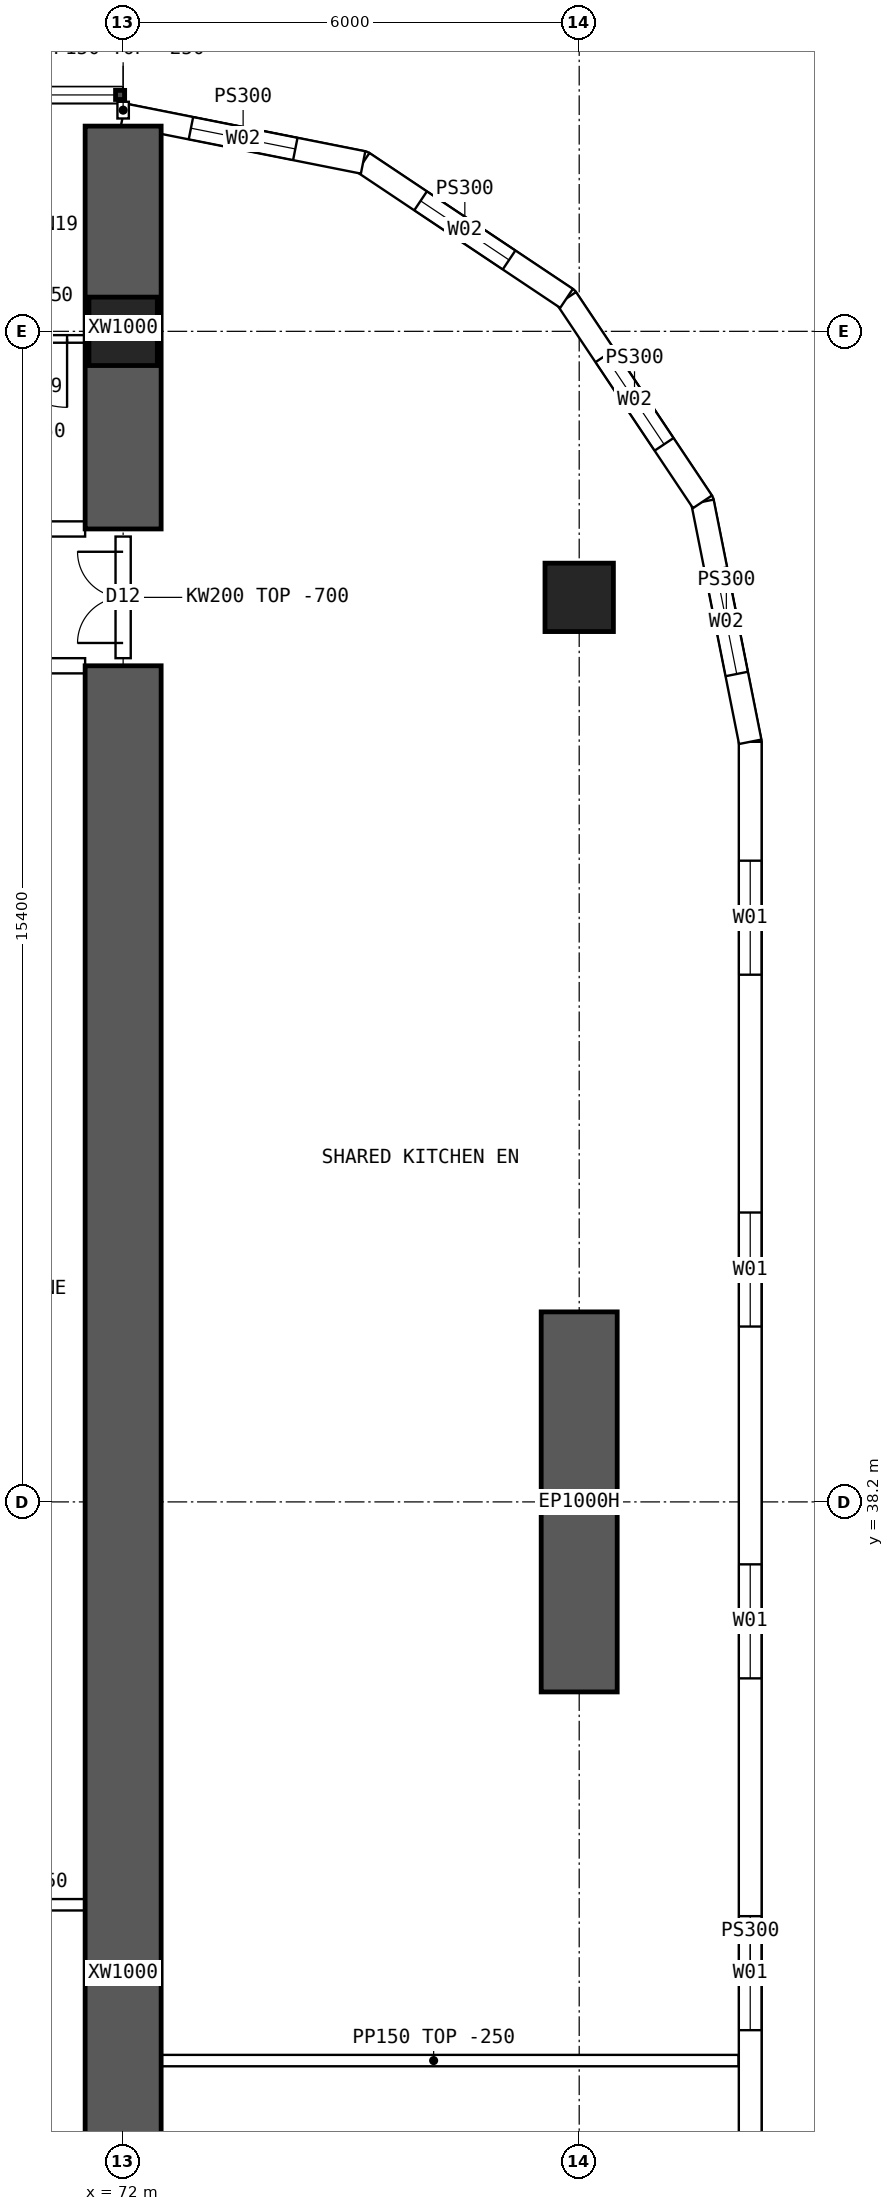
"""IFC4 building model, lengths in metres.
Left out: names, types, materials, properties, quantities, classifications, styles, units other than length and angle.
Written with IfcOpenShell. Run it as: python <this file> out.ifc"""

import sys

from ifc_helpers import new_model, si_unit, direction, frame, frame_2d, origin, origin_2d, place, context, subcontext, project, spatial, polyline, rectangle, hollow_rectangle, outline, extrude, element, fill, save


model = new_model("IFC4")
c1 = context("Model", 3, precision=1e-05, world=origin(), true_north=direction((0.0, 1.0)))
c2 = subcontext(c1, "Body", "Model", "MODEL_VIEW")
j1 = project(units=[si_unit("LENGTHUNIT", "METRE"), si_unit("PLANEANGLEUNIT", "RADIAN")], contexts=[c1])
p1 = place(None, origin())
s1 = spatial("IfcSite", under=j1, at=p1, CompositionType="ELEMENT")
p2 = place(p1, origin())
s2 = spatial("IfcBuilding", under=s1, at=p2, CompositionType="ELEMENT")
p3 = place(p2, frame((0.0, 0.0, 27.7)))
s3 = spatial("IfcBuildingStorey", under=s2, at=p3, CompositionType="ELEMENT", Elevation=27.7)
for number, where, z_axis, x_axis in (
    (1, (72.0, 53.6, 0.0), (0.0, 0.0, 1.0), (1.0, 0.0, 0.0)),
    (2, (78.0, 50.1, 0.0), (0.0, 0.0, 1.0), (1.0, 0.0, 0.0)),
):
    element("IfcColumn", number, at=place(p3, frame(where, z_axis=z_axis, x_axis=x_axis)), inside=s3, PredefinedType="COLUMN", context=c2, shape_type="SweptSolid", body=[
        extrude(hollow_rectangle(XDim=0.9, YDim=0.9, WallThickness=0.09, at=origin_2d()), origin(), (0.0, 0.0, 1.0), 3.75),
    ])
p4 = place(p3, frame((78.0, 35.7, 0.0), z_axis=(0.0, 0.0, 1.0), x_axis=(0.0, 1.0, 0.0)))
e3 = element("IfcWall", 3, at=p4, inside=s3, PredefinedType="SHEAR", context=c2, shape_type="SweptSolid", body=[
    extrude(rectangle(XDim=5.0, YDim=1.0, at=frame_2d((2.5, 0.0))), origin(), (0.0, 0.0, 1.0), 3.75),
])
p5 = place(p3, frame((72.0, 51.0, 0.0), z_axis=(0.0, 0.0, 1.0), x_axis=(0.0, 1.0, 0.0)))
e4 = element("IfcWall", 4, at=p5, inside=s3, PredefinedType="SHEAR", context=c2, shape_type="SweptSolid", body=[
    extrude(rectangle(XDim=5.3, YDim=1.0, at=frame_2d((2.65, 0.0))), origin(), (0.0, 0.0, 1.0), 3.75),
])
p6 = place(p3, frame((72.0, 14.8, 0.0), z_axis=(0.0, 0.0, 1.0), x_axis=(0.0, 1.0, 0.0)))
e5 = element("IfcWall", 5, at=p6, inside=s3, PredefinedType="SHEAR", context=c2, shape_type="SweptSolid", body=[
    extrude(rectangle(XDim=34.4, YDim=1.0, at=frame_2d((17.2, 0.0))), origin(), (0.0, 0.0, 1.0), 3.75),
])
p7 = place(p3, frame((80.25, 15.8, 0.0), z_axis=(0.0, 0.0, 1.0), x_axis=(0.0, 1.0, 0.0)))
e6 = element("IfcWall", 6, at=p7, inside=s3, PredefinedType="SOLIDWALL", context=c2, shape_type="SweptSolid", body=[
    extrude(outline(polyline([(-0.015, -0.15), (32.415, -0.15), (32.385, 0.15), (0.015, 0.15), (-0.015, -0.15)])), origin(), (0.0, 0.0, 1.0), 3.5),
])
p8 = place(p7, frame((1.564, 0.0, 0.9)))
e7 = element("IfcOpeningElement", 7, at=p8, cuts=e6, PredefinedType="OPENING", context=c2, shape_type="SweptSolid", body=[
    extrude(rectangle(XDim=1.5, YDim=2.0, at=frame_2d((0.75, 1.0))), frame((0.0, 0.16, 0.0), z_axis=(0.0, -1.0, 0.0), x_axis=(1.0, 0.0, 0.0)), (0.0, 0.0, 1.0), 0.32),
])
p9 = place(p7, frame((6.193, 0.0, 0.9)))
e8 = element("IfcOpeningElement", 8, at=p9, cuts=e6, PredefinedType="OPENING", context=c2, shape_type="SweptSolid", body=[
    extrude(rectangle(XDim=1.5, YDim=2.0, at=frame_2d((0.75, 1.0))), frame((0.0, 0.16, 0.0), z_axis=(0.0, -1.0, 0.0), x_axis=(1.0, 0.0, 0.0)), (0.0, 0.0, 1.0), 0.32),
])
p10 = place(p7, frame((10.822, 0.0, 0.9)))
e9 = element("IfcOpeningElement", 9, at=p10, cuts=e6, PredefinedType="OPENING", context=c2, shape_type="SweptSolid", body=[
    extrude(rectangle(XDim=1.5, YDim=2.0, at=frame_2d((0.75, 1.0))), frame((0.0, 0.16, 0.0), z_axis=(0.0, -1.0, 0.0), x_axis=(1.0, 0.0, 0.0)), (0.0, 0.0, 1.0), 0.32),
])
p11 = place(p7, frame((15.45, 0.0, 0.9)))
e10 = element("IfcOpeningElement", 10, at=p11, cuts=e6, PredefinedType="OPENING", context=c2, shape_type="SweptSolid", body=[
    extrude(rectangle(XDim=1.5, YDim=2.0, at=frame_2d((0.75, 1.0))), frame((0.0, 0.16, 0.0), z_axis=(0.0, -1.0, 0.0), x_axis=(1.0, 0.0, 0.0)), (0.0, 0.0, 1.0), 0.32),
])
p12 = place(p7, frame((20.079, 0.0, 0.9)))
e11 = element("IfcOpeningElement", 11, at=p12, cuts=e6, PredefinedType="OPENING", context=c2, shape_type="SweptSolid", body=[
    extrude(rectangle(XDim=1.5, YDim=2.0, at=frame_2d((0.75, 1.0))), frame((0.0, 0.16, 0.0), z_axis=(0.0, -1.0, 0.0), x_axis=(1.0, 0.0, 0.0)), (0.0, 0.0, 1.0), 0.32),
])
p13 = place(p7, frame((24.707, 0.0, 0.9)))
e12 = element("IfcOpeningElement", 12, at=p13, cuts=e6, PredefinedType="OPENING", context=c2, shape_type="SweptSolid", body=[
    extrude(rectangle(XDim=1.5, YDim=2.0, at=frame_2d((0.75, 1.0))), frame((0.0, 0.16, 0.0), z_axis=(0.0, -1.0, 0.0), x_axis=(1.0, 0.0, 0.0)), (0.0, 0.0, 1.0), 0.32),
])
p14 = place(p7, frame((29.336, 0.0, 0.9)))
e13 = element("IfcOpeningElement", 13, at=p14, cuts=e6, PredefinedType="OPENING", context=c2, shape_type="SweptSolid", body=[
    extrude(rectangle(XDim=1.5, YDim=2.0, at=frame_2d((0.75, 1.0))), frame((0.0, 0.16, 0.0), z_axis=(0.0, -1.0, 0.0), x_axis=(1.0, 0.0, 0.0)), (0.0, 0.0, 1.0), 0.32),
])
p15 = place(p3, frame((80.25, 48.2, 0.0), z_axis=(0.0, 0.0, 1.0), x_axis=(-0.195065901187, 0.980790137692, 0.0)))
e14 = element("IfcWall", 14, at=p15, inside=s3, PredefinedType="SOLIDWALL", context=c2, shape_type="SweptSolid", body=[
    extrude(outline(polyline([(-0.015, -0.15), (3.249, -0.15), (3.189, 0.15), (0.015, 0.15), (-0.015, -0.15)])), origin(), (0.0, 0.0, 1.0), 3.5),
])
p16 = place(p15, frame((0.909, 0.0, 0.9)))
e15 = element("IfcOpeningElement", 15, at=p16, cuts=e14, PredefinedType="OPENING", context=c2, shape_type="SweptSolid", body=[
    extrude(rectangle(XDim=1.4, YDim=1.8, at=frame_2d((0.7, 0.9))), frame((0.0, 0.16, 0.0), z_axis=(0.0, -1.0, 0.0), x_axis=(1.0, 0.0, 0.0)), (0.0, 0.0, 1.0), 0.32),
])
p17 = place(p3, frame((79.622, 51.357, 0.0), z_axis=(0.0, 0.0, 1.0), x_axis=(-0.555609954424, 0.831443069936, 0.0)))
e16 = element("IfcWall", 16, at=p17, inside=s3, PredefinedType="SOLIDWALL", context=c2, shape_type="SweptSolid", body=[
    extrude(outline(polyline([(-0.03, -0.15), (3.249, -0.15), (3.189, 0.15), (0.03, 0.15), (-0.03, -0.15)])), origin(), (0.0, 0.0, 1.0), 3.5),
])
p18 = place(p17, frame((0.909, 0.0, 0.9)))
e17 = element("IfcOpeningElement", 17, at=p18, cuts=e16, PredefinedType="OPENING", context=c2, shape_type="SweptSolid", body=[
    extrude(rectangle(XDim=1.4, YDim=1.8, at=frame_2d((0.7, 0.9))), frame((0.0, 0.16, 0.0), z_axis=(0.0, -1.0, 0.0), x_axis=(1.0, 0.0, 0.0)), (0.0, 0.0, 1.0), 0.32),
])
p19 = place(p3, frame((77.833, 54.034, 0.0), z_axis=(0.0, 0.0, 1.0), x_axis=(-0.831478105043, 0.555557522525, 0.0)))
e18 = element("IfcWall", 18, at=p19, inside=s3, PredefinedType="SOLIDWALL", context=c2, shape_type="SweptSolid", body=[
    extrude(outline(polyline([(-0.03, -0.15), (3.249, -0.15), (3.189, 0.15), (0.03, 0.15), (-0.03, -0.15)])), origin(), (0.0, 0.0, 1.0), 3.5),
])
p20 = place(p19, frame((0.909, 0.0, 0.9)))
e19 = element("IfcOpeningElement", 19, at=p20, cuts=e18, PredefinedType="OPENING", context=c2, shape_type="SweptSolid", body=[
    extrude(rectangle(XDim=1.4, YDim=1.8, at=frame_2d((0.7, 0.9))), frame((0.0, 0.16, 0.0), z_axis=(0.0, -1.0, 0.0), x_axis=(1.0, 0.0, 0.0)), (0.0, 0.0, 1.0), 0.32),
])
p21 = place(p3, frame((75.157, 55.822, 0.0), z_axis=(0.0, 0.0, 1.0), x_axis=(-0.980787251524, 0.195080412259, 0.0)))
e20 = element("IfcWall", 20, at=p21, inside=s3, PredefinedType="SOLIDWALL", context=c2, shape_type="SweptSolid", body=[
    extrude(outline(polyline([(-0.03, -0.15), (3.249, -0.15), (3.189, 0.15), (0.03, 0.15), (-0.03, -0.15)])), origin(), (0.0, 0.0, 1.0), 3.5),
])
p22 = place(p21, frame((0.909, 0.0, 0.9)))
e21 = element("IfcOpeningElement", 21, at=p22, cuts=e20, PredefinedType="OPENING", context=c2, shape_type="SweptSolid", body=[
    extrude(rectangle(XDim=1.4, YDim=1.8, at=frame_2d((0.7, 0.9))), frame((0.0, 0.16, 0.0), z_axis=(0.0, -1.0, 0.0), x_axis=(1.0, 0.0, 0.0)), (0.0, 0.0, 1.0), 0.32),
])
p23 = place(p3, frame((66.5, 51.0, 0.0), z_axis=(0.0, 0.0, 1.0), x_axis=(1.0, 0.0, 0.0)))
e22 = element("IfcWall", 22, at=p23, inside=s3, PredefinedType="SOLIDWALL", context=c2, shape_type="SweptSolid", body=[
    extrude(outline(polyline([(0.0, 0.0), (5.0, 0.0), (5.0, 3.1), (0.0, 3.1), (0.0, 0.0)])), frame((0.0, 0.1, 0.0), z_axis=(0.0, -1.0, 0.0), x_axis=(1.0, 0.0, 0.0)), (0.0, 0.0, 1.0), 0.2),
])
p24 = place(p23, frame((1.425, 0.0, 0.0)))
e23 = element("IfcOpeningElement", 23, at=p24, cuts=e22, PredefinedType="OPENING", context=c2, shape_type="SweptSolid", body=[
    extrude(rectangle(XDim=0.9, YDim=2.1, at=frame_2d((0.45, 1.05))), frame((0.0, 0.11, 0.0), z_axis=(0.0, -1.0, 0.0), x_axis=(1.0, 0.0, 0.0)), (0.0, 0.0, 1.0), 0.22),
])
p25 = place(p23, frame((2.675, 0.0, 0.0)))
e24 = element("IfcOpeningElement", 24, at=p25, cuts=e22, PredefinedType="OPENING", context=c2, shape_type="SweptSolid", body=[
    extrude(rectangle(XDim=0.9, YDim=2.1, at=frame_2d((0.45, 1.05))), frame((0.0, 0.11, 0.0), z_axis=(0.0, -1.0, 0.0), x_axis=(1.0, 0.0, 0.0)), (0.0, 0.0, 1.0), 0.22),
])
p26 = place(p3, frame((66.5, 49.2, 0.0), z_axis=(0.0, 0.0, 1.0), x_axis=(1.0, 0.0, 0.0)))
e25 = element("IfcWall", 25, at=p26, inside=s3, PredefinedType="SOLIDWALL", context=c2, shape_type="SweptSolid", body=[
    extrude(rectangle(XDim=5.0, YDim=0.2, at=frame_2d((2.5, 0.0))), origin(), (0.0, 0.0, 1.0), 3.5),
])
p27 = place(p26, frame((0.2, 0.0, 0.0)))
e26 = element("IfcOpeningElement", 26, at=p27, cuts=e25, PredefinedType="OPENING", context=c2, shape_type="SweptSolid", body=[
    extrude(rectangle(XDim=1.6, YDim=2.1, at=frame_2d((0.8, 1.05))), frame((0.0, 0.11, 0.0), z_axis=(0.0, -1.0, 0.0), x_axis=(1.0, 0.0, 0.0)), (0.0, 0.0, 1.0), 0.22),
])
p28 = place(p3, frame((70.125, 53.5, 0.0), z_axis=(0.0, 0.0, 1.0), x_axis=(1.0, 0.0, 0.0)))
e27 = element("IfcWall", 27, at=p28, inside=s3, PredefinedType="PARTITIONING", context=c2, shape_type="SweptSolid", body=[
    extrude(outline(polyline([(0.0, 0.0), (1.425, 0.0), (1.425, 3.1), (0.0, 3.1), (0.0, 0.0)])), frame((0.0, 0.05, 0.0), z_axis=(0.0, -1.0, 0.0), x_axis=(1.0, 0.0, 0.0)), (0.0, 0.0, 1.0), 0.1),
])
p29 = place(p28, frame((0.238, 0.0, 0.0)))
e28 = element("IfcOpeningElement", 28, at=p29, cuts=e27, PredefinedType="OPENING", context=c2, shape_type="SweptSolid", body=[
    extrude(rectangle(XDim=0.9, YDim=2.1, at=frame_2d((0.45, 1.05))), frame((0.0, 0.06, 0.0), z_axis=(0.0, -1.0, 0.0), x_axis=(1.0, 0.0, 0.0)), (0.0, 0.0, 1.0), 0.12),
])
p30 = place(p3, frame((68.4, 32.9, 0.0), z_axis=(0.0, 0.0, 1.0), x_axis=(1.0, 0.0, 0.0)))
e29 = element("IfcWall", 29, at=p30, inside=s3, PredefinedType="PARTITIONING", context=c2, shape_type="SweptSolid", body=[
    extrude(rectangle(XDim=3.6, YDim=0.15, at=frame_2d((1.8, 0.0))), origin(), (0.0, 0.0, 1.0), 3.5),
])
p31 = place(p3, frame((72.075, 30.85, 0.0), z_axis=(0.0, 0.0, 1.0), x_axis=(1.0, 0.0, 0.0)))
e30 = element("IfcWall", 30, at=p31, inside=s3, PredefinedType="PARTITIONING", context=c2, shape_type="SweptSolid", body=[
    extrude(outline(polyline([(0.0, 0.0), (8.02, 0.0), (8.02, 3.5), (6.227, 3.5), (6.225, 3.05), (5.627, 3.05), (5.625, 3.5), (0.0, 3.5), (0.0, 0.0)])), frame((0.0, 0.075, 0.0), z_axis=(0.0, -1.0, 0.0), x_axis=(1.0, 0.0, 0.0)), (0.0, 0.0, 1.0), 0.15),
])
p32 = place(p3, frame((72.0, 49.3, 0.0), z_axis=(0.0, 0.0, 1.0), x_axis=(0.0, 1.0, 0.0)))
e31 = element("IfcWall", 31, at=p32, inside=s3, PredefinedType="SOLIDWALL", context=c2, shape_type="SweptSolid", body=[
    extrude(outline(polyline([(0.0, 0.0), (1.6, 0.0), (1.6, 3.05), (0.0, 3.05), (0.0, 0.0)])), frame((0.0, 0.1, 0.0), z_axis=(0.0, -1.0, 0.0), x_axis=(1.0, 0.0, 0.0)), (0.0, 0.0, 1.0), 0.2),
])
p33 = place(p32, frame((0.2, 0.0, 0.0)))
e32 = element("IfcOpeningElement", 32, at=p33, cuts=e31, PredefinedType="OPENING", context=c2, shape_type="SweptSolid", body=[
    extrude(rectangle(XDim=1.2, YDim=2.1, at=frame_2d((0.6, 1.05))), frame((0.0, 0.11, 0.0), z_axis=(0.0, -1.0, 0.0), x_axis=(1.0, 0.0, 0.0)), (0.0, 0.0, 1.0), 0.22),
])
p34 = place(p3, frame((72.0, 56.4, 0.0), z_axis=(0.0, 0.0, 1.0), x_axis=(0.0, 1.0, 0.0)))
e33 = element("IfcWall", 33, at=p34, inside=s3, PredefinedType="PARTITIONING", context=c2, shape_type="SweptSolid", body=[
    extrude(rectangle(XDim=0.22, YDim=0.15, at=frame_2d((0.11, 0.0))), origin(), (0.0, 0.0, 1.0), 3.5),
])
p35 = place(p11, origin())
e34 = element("IfcWindow", 34, at=p35, inside=s3, PartitioningType="SINGLE_PANEL", PredefinedType="WINDOW", context=c2, shape_type="SweptSolid", body=[
    extrude(rectangle(XDim=1.5, YDim=2.0, at=frame_2d((0.75, 1.0))), frame((0.0, 0.03, 0.0), z_axis=(0.0, -1.0, 0.0), x_axis=(1.0, 0.0, 0.0)), (0.0, 0.0, 1.0), 0.06),
])
fill(e10, e34)
p36 = place(p12, origin())
e35 = element("IfcWindow", 35, at=p36, inside=s3, PartitioningType="SINGLE_PANEL", PredefinedType="WINDOW", context=c2, shape_type="SweptSolid", body=[
    extrude(rectangle(XDim=1.5, YDim=2.0, at=frame_2d((0.75, 1.0))), frame((0.0, 0.03, 0.0), z_axis=(0.0, -1.0, 0.0), x_axis=(1.0, 0.0, 0.0)), (0.0, 0.0, 1.0), 0.06),
])
fill(e11, e35)
p37 = place(p13, origin())
e36 = element("IfcWindow", 36, at=p37, inside=s3, PartitioningType="SINGLE_PANEL", PredefinedType="WINDOW", context=c2, shape_type="SweptSolid", body=[
    extrude(rectangle(XDim=1.5, YDim=2.0, at=frame_2d((0.75, 1.0))), frame((0.0, 0.03, 0.0), z_axis=(0.0, -1.0, 0.0), x_axis=(1.0, 0.0, 0.0)), (0.0, 0.0, 1.0), 0.06),
])
fill(e12, e36)
p38 = place(p14, origin())
e37 = element("IfcWindow", 37, at=p38, inside=s3, PartitioningType="SINGLE_PANEL", PredefinedType="WINDOW", context=c2, shape_type="SweptSolid", body=[
    extrude(rectangle(XDim=1.5, YDim=2.0, at=frame_2d((0.75, 1.0))), frame((0.0, 0.03, 0.0), z_axis=(0.0, -1.0, 0.0), x_axis=(1.0, 0.0, 0.0)), (0.0, 0.0, 1.0), 0.06),
])
fill(e13, e37)
p39 = place(p16, origin())
e38 = element("IfcWindow", 38, at=p39, inside=s3, PartitioningType="SINGLE_PANEL", PredefinedType="WINDOW", context=c2, shape_type="SweptSolid", body=[
    extrude(rectangle(XDim=1.4, YDim=1.8, at=frame_2d((0.7, 0.9))), frame((0.0, 0.03, 0.0), z_axis=(0.0, -1.0, 0.0), x_axis=(1.0, 0.0, 0.0)), (0.0, 0.0, 1.0), 0.06),
])
fill(e15, e38)
p40 = place(p18, origin())
e39 = element("IfcWindow", 39, at=p40, inside=s3, PartitioningType="SINGLE_PANEL", PredefinedType="WINDOW", context=c2, shape_type="SweptSolid", body=[
    extrude(rectangle(XDim=1.4, YDim=1.8, at=frame_2d((0.7, 0.9))), frame((0.0, 0.03, 0.0), z_axis=(0.0, -1.0, 0.0), x_axis=(1.0, 0.0, 0.0)), (0.0, 0.0, 1.0), 0.06),
])
fill(e17, e39)
p41 = place(p20, origin())
e40 = element("IfcWindow", 40, at=p41, inside=s3, PartitioningType="SINGLE_PANEL", PredefinedType="WINDOW", context=c2, shape_type="SweptSolid", body=[
    extrude(rectangle(XDim=1.4, YDim=1.8, at=frame_2d((0.7, 0.9))), frame((0.0, 0.03, 0.0), z_axis=(0.0, -1.0, 0.0), x_axis=(1.0, 0.0, 0.0)), (0.0, 0.0, 1.0), 0.06),
])
fill(e19, e40)
p42 = place(p22, origin())
e41 = element("IfcWindow", 41, at=p42, inside=s3, PartitioningType="SINGLE_PANEL", PredefinedType="WINDOW", context=c2, shape_type="SweptSolid", body=[
    extrude(rectangle(XDim=1.4, YDim=1.8, at=frame_2d((0.7, 0.9))), frame((0.0, 0.03, 0.0), z_axis=(0.0, -1.0, 0.0), x_axis=(1.0, 0.0, 0.0)), (0.0, 0.0, 1.0), 0.06),
])
fill(e21, e41)
p43 = place(p29, origin())
e42 = element("IfcDoor", 42, at=p43, inside=s3, OperationType="SINGLE_SWING_RIGHT", PredefinedType="DOOR", context=c2, shape_type="SweptSolid", body=[
    extrude(rectangle(XDim=0.9, YDim=2.1, at=frame_2d((0.45, 1.05))), frame((0.0, 0.025, 0.0), z_axis=(0.0, -1.0, 0.0), x_axis=(1.0, 0.0, 0.0)), (0.0, 0.0, 1.0), 0.05),
])
fill(e28, e42)
p44 = place(p33, origin())
e43 = element("IfcDoor", 43, at=p44, inside=s3, OperationType="DOUBLE_DOOR_SINGLE_SWING", PredefinedType="DOOR", context=c2, shape_type="SweptSolid", body=[
    extrude(rectangle(XDim=1.2, YDim=2.1, at=frame_2d((0.6, 1.05))), frame((0.0, 0.025, 0.0), z_axis=(0.0, -1.0, 0.0), x_axis=(1.0, 0.0, 0.0)), (0.0, 0.0, 1.0), 0.05),
])
fill(e32, e43)
save(model, sys.argv[1])
